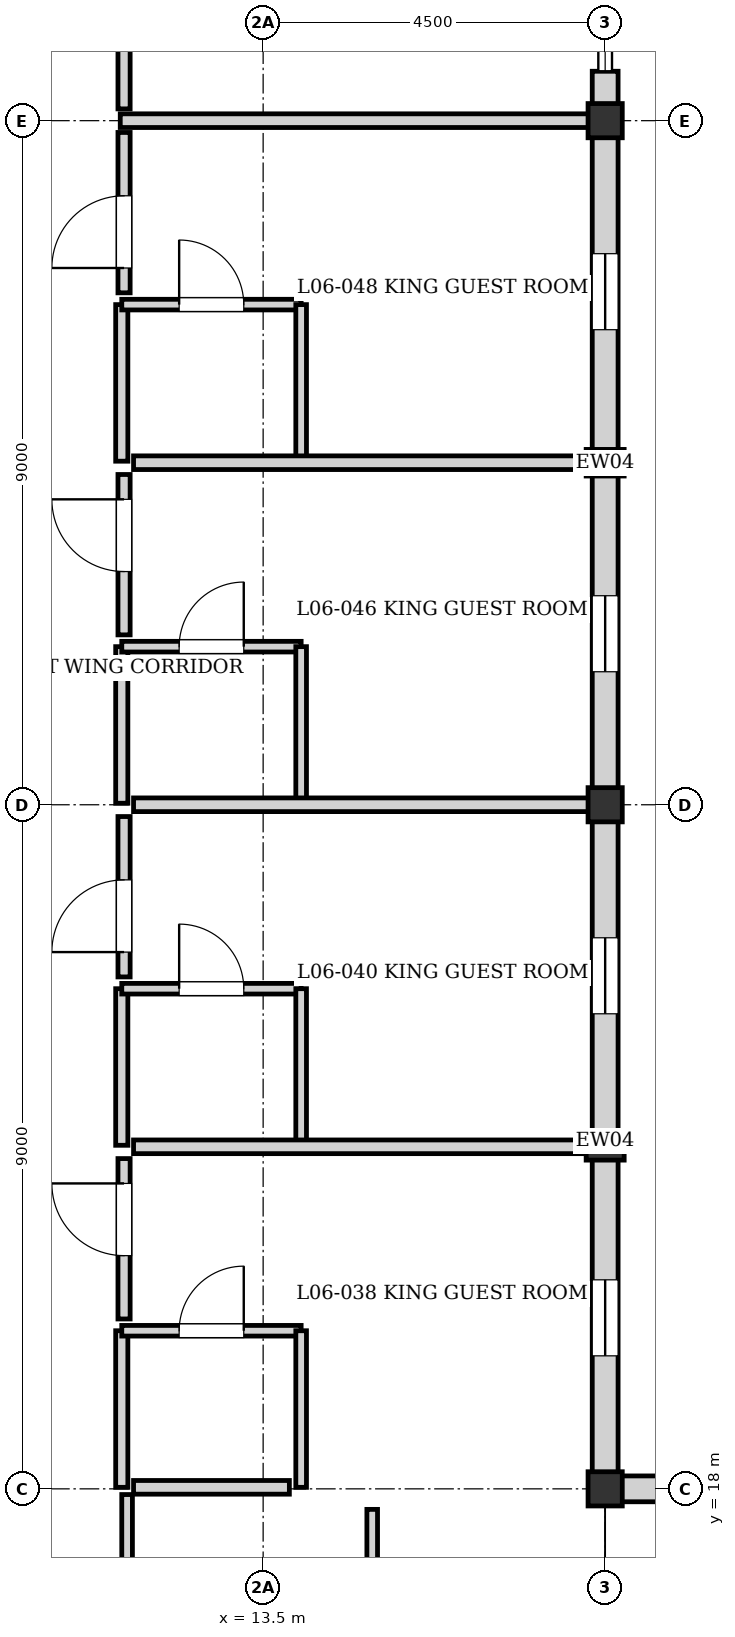
"""IFC4 building model, lengths in metres.
Left out: names, types, materials, properties, quantities, classifications, styles, units other than length and angle.
Written with IfcOpenShell. Run it as: python <this file> out.ifc"""

import sys

from ifc_helpers import new_model, si_unit, direction, frame, frame_2d, origin, origin_2d, place, context, subcontext, project, spatial, rectangle, extrude, element, fill, save


model = new_model("IFC4")
c1 = context("Model", 3, precision=1e-05, world=origin(), true_north=direction((0.0, 1.0)))
c2 = subcontext(c1, "Body", "Model", "MODEL_VIEW")
j1 = project(units=[si_unit("LENGTHUNIT", "METRE"), si_unit("PLANEANGLEUNIT", "RADIAN")], contexts=[c1])
p1 = place(None, origin())
s1 = spatial("IfcSite", under=j1, at=p1, CompositionType="ELEMENT")
p2 = place(p1, origin())
s2 = spatial("IfcBuilding", under=s1, at=p2, CompositionType="ELEMENT")
p3 = place(p2, frame((0.0, 0.0, 20.64)))
s3 = spatial("IfcBuildingStorey", under=s2, at=p3, CompositionType="ELEMENT", Elevation=20.64)
for number, where, z_axis, x_axis in (
    (1, (18.0, 18.0, 0.0), (0.0, 0.0, 1.0), (1.0, 0.0, 0.0)),
    (2, (18.0, 27.0, 0.0), (0.0, 0.0, 1.0), (1.0, 0.0, 0.0)),
    (3, (18.0, 36.0, 0.0), (0.0, 0.0, 1.0), (1.0, 0.0, 0.0)),
):
    element("IfcColumn", number, at=place(p3, frame(where, z_axis=z_axis, x_axis=x_axis)), inside=s3, PredefinedType="COLUMN", context=c2, shape_type="SweptSolid", body=[
        extrude(rectangle(XDim=0.45, YDim=0.45, at=origin_2d()), origin(), (0.0, 0.0, 1.0), 3.04),
    ])
for number, where, z_axis, x_axis in (
    (4, (18.0, 22.5, 0.0), (0.0, 0.0, 1.0), (0.0, 1.0, 0.0)),
    (5, (18.0, 31.5, 0.0), (0.0, 0.0, 1.0), (0.0, 1.0, 0.0)),
):
    element("IfcColumn", number, at=place(p3, frame(where, z_axis=z_axis, x_axis=x_axis)), inside=s3, PredefinedType="PILASTER", context=c2, shape_type="SweptSolid", body=[
        extrude(rectangle(XDim=0.35, YDim=0.5, at=origin_2d()), origin(), (0.0, 0.0, 1.0), 3.04),
    ])
p4 = place(p3, frame((18.0, 36.65, 0.0), z_axis=(0.0, 0.0, 1.0), x_axis=(0.0, -1.0, 0.0)))
e6 = element("IfcWall", 6, at=p4, inside=s3, PredefinedType="SOLIDWALL", context=c2, shape_type="SweptSolid", body=[
    extrude(rectangle(XDim=0.65, YDim=0.34, at=frame_2d((0.325, 0.0))), origin(), (0.0, 0.0, 1.0), 2.48),
])
p5 = place(p3, frame((18.0, 36.0, 0.0), z_axis=(0.0, 0.0, 1.0), x_axis=(0.0, -1.0, 0.0)))
e7 = element("IfcWall", 7, at=p5, inside=s3, PredefinedType="SOLIDWALL", context=c2, shape_type="SweptSolid", body=[
    extrude(rectangle(XDim=9.0, YDim=0.34, at=frame_2d((4.5, 0.0))), origin(), (0.0, 0.0, 1.0), 2.82),
])
p6 = place(p5, frame((1.75, 0.0, 0.35)))
e8 = element("IfcOpeningElement", 8, at=p6, cuts=e7, PredefinedType="OPENING", context=c2, shape_type="SweptSolid", body=[
    extrude(rectangle(XDim=1.0, YDim=1.6, at=frame_2d((0.5, 0.8))), frame((0.0, 0.18, 0.0), z_axis=(0.0, -1.0, 0.0), x_axis=(1.0, 0.0, 0.0)), (0.0, 0.0, 1.0), 0.36),
])
p7 = place(p5, frame((6.25, 0.0, 0.35)))
e9 = element("IfcOpeningElement", 9, at=p7, cuts=e7, PredefinedType="OPENING", context=c2, shape_type="SweptSolid", body=[
    extrude(rectangle(XDim=1.0, YDim=1.6, at=frame_2d((0.5, 0.8))), frame((0.0, 0.18, 0.0), z_axis=(0.0, -1.0, 0.0), x_axis=(1.0, 0.0, 0.0)), (0.0, 0.0, 1.0), 0.36),
])
p8 = place(p3, frame((18.0, 27.0, 0.0), z_axis=(0.0, 0.0, 1.0), x_axis=(0.0, -1.0, 0.0)))
e10 = element("IfcWall", 10, at=p8, inside=s3, PredefinedType="SOLIDWALL", context=c2, shape_type="SweptSolid", body=[
    extrude(rectangle(XDim=8.845, YDim=0.34, at=frame_2d((4.422, 0.0))), origin(), (0.0, 0.0, 1.0), 2.38),
])
p9 = place(p8, frame((1.75, 0.0, 0.35)))
e11 = element("IfcOpeningElement", 11, at=p9, cuts=e10, PredefinedType="OPENING", context=c2, shape_type="SweptSolid", body=[
    extrude(rectangle(XDim=1.0, YDim=1.6, at=frame_2d((0.5, 0.8))), frame((0.0, 0.18, 0.0), z_axis=(0.0, -1.0, 0.0), x_axis=(1.0, 0.0, 0.0)), (0.0, 0.0, 1.0), 0.36),
])
p10 = place(p8, frame((6.25, 0.0, 0.35)))
e12 = element("IfcOpeningElement", 12, at=p10, cuts=e10, PredefinedType="OPENING", context=c2, shape_type="SweptSolid", body=[
    extrude(rectangle(XDim=1.0, YDim=1.6, at=frame_2d((0.5, 0.8))), frame((0.0, 0.18, 0.0), z_axis=(0.0, -1.0, 0.0), x_axis=(1.0, 0.0, 0.0)), (0.0, 0.0, 1.0), 0.36),
])
p11 = place(p3, frame((18.0, 18.0, 0.0), z_axis=(0.0, 0.0, 1.0), x_axis=(1.0, 0.0, 0.0)))
e13 = element("IfcWall", 13, at=p11, inside=s3, PredefinedType="SOLIDWALL", context=c2, shape_type="SweptSolid", body=[
    extrude(rectangle(XDim=9.0, YDim=0.34, at=frame_2d((4.5, 0.0))), origin(), (0.0, 0.0, 1.0), 2.42),
])
p12 = place(p11, frame((1.75, 0.0, 0.35)))
e14 = element("IfcOpeningElement", 14, at=p12, cuts=e13, PredefinedType="OPENING", context=c2, shape_type="SweptSolid", body=[
    extrude(rectangle(XDim=1.0, YDim=1.6, at=frame_2d((0.5, 0.8))), frame((0.0, 0.18, 0.0), z_axis=(0.0, -1.0, 0.0), x_axis=(1.0, 0.0, 0.0)), (0.0, 0.0, 1.0), 0.36),
])
p13 = place(p11, frame((6.25, 0.0, 0.35)))
e15 = element("IfcOpeningElement", 15, at=p13, cuts=e13, PredefinedType="OPENING", context=c2, shape_type="SweptSolid", body=[
    extrude(rectangle(XDim=1.0, YDim=1.6, at=frame_2d((0.5, 0.8))), frame((0.0, 0.18, 0.0), z_axis=(0.0, -1.0, 0.0), x_axis=(1.0, 0.0, 0.0)), (0.0, 0.0, 1.0), 0.36),
])
p14 = place(p3, frame((11.64, 18.02, 0.0), z_axis=(0.0, 0.0, 1.0), x_axis=(0.0, 1.0, 0.0)))
e16 = element("IfcWall", 16, at=p14, inside=s3, PredefinedType="PARTITIONING", context=c2, shape_type="SweptSolid", body=[
    extrude(rectangle(XDim=2.06, YDim=0.16, at=frame_2d((1.03, 0.0))), origin(), (0.0, 0.0, 1.0), 2.82),
])
p15 = place(p3, frame((11.64, 20.08, 0.0), z_axis=(0.0, 0.0, 1.0), x_axis=(1.0, 0.0, 0.0)))
e17 = element("IfcWall", 17, at=p15, inside=s3, PredefinedType="PLUMBINGWALL", context=c2, shape_type="SweptSolid", body=[
    extrude(rectangle(XDim=2.36, YDim=0.14, at=frame_2d((1.18, 0.0))), origin(), (0.0, 0.0, 1.0), 2.82),
])
p16 = place(p15, frame((0.755, 0.0, 0.0)))
e18 = element("IfcOpeningElement", 18, at=p16, cuts=e17, PredefinedType="OPENING", context=c2, shape_type="SweptSolid", body=[
    extrude(rectangle(XDim=0.85, YDim=2.04, at=frame_2d((0.425, 1.02))), frame((0.0, 0.08, 0.0), z_axis=(0.0, -1.0, 0.0), x_axis=(1.0, 0.0, 0.0)), (0.0, 0.0, 1.0), 0.16),
])
p17 = place(p3, frame((14.0, 18.02, 0.0), z_axis=(0.0, 0.0, 1.0), x_axis=(0.0, 1.0, 0.0)))
e19 = element("IfcWall", 19, at=p17, inside=s3, PredefinedType="PLUMBINGWALL", context=c2, shape_type="SweptSolid", body=[
    extrude(rectangle(XDim=2.06, YDim=0.14, at=frame_2d((1.03, 0.0))), origin(), (0.0, 0.0, 1.0), 2.82),
])
p18 = place(p3, frame((11.64, 22.52, 0.0), z_axis=(0.0, 0.0, 1.0), x_axis=(0.0, 1.0, 0.0)))
e20 = element("IfcWall", 20, at=p18, inside=s3, PredefinedType="PARTITIONING", context=c2, shape_type="SweptSolid", body=[
    extrude(rectangle(XDim=2.06, YDim=0.16, at=frame_2d((1.03, 0.0))), origin(), (0.0, 0.0, 1.0), 2.82),
])
p19 = place(p3, frame((11.64, 24.58, 0.0), z_axis=(0.0, 0.0, 1.0), x_axis=(1.0, 0.0, 0.0)))
e21 = element("IfcWall", 21, at=p19, inside=s3, PredefinedType="PLUMBINGWALL", context=c2, shape_type="SweptSolid", body=[
    extrude(rectangle(XDim=2.36, YDim=0.14, at=frame_2d((1.18, 0.0))), origin(), (0.0, 0.0, 1.0), 2.82),
])
p20 = place(p19, frame((0.755, 0.0, 0.0)))
e22 = element("IfcOpeningElement", 22, at=p20, cuts=e21, PredefinedType="OPENING", context=c2, shape_type="SweptSolid", body=[
    extrude(rectangle(XDim=0.85, YDim=2.04, at=frame_2d((0.425, 1.02))), frame((0.0, 0.08, 0.0), z_axis=(0.0, -1.0, 0.0), x_axis=(1.0, 0.0, 0.0)), (0.0, 0.0, 1.0), 0.16),
])
p21 = place(p3, frame((14.0, 22.52, 0.0), z_axis=(0.0, 0.0, 1.0), x_axis=(0.0, 1.0, 0.0)))
e23 = element("IfcWall", 23, at=p21, inside=s3, PredefinedType="PLUMBINGWALL", context=c2, shape_type="SweptSolid", body=[
    extrude(rectangle(XDim=2.06, YDim=0.14, at=frame_2d((1.03, 0.0))), origin(), (0.0, 0.0, 1.0), 2.82),
])
p22 = place(p3, frame((11.64, 27.02, 0.0), z_axis=(0.0, 0.0, 1.0), x_axis=(0.0, 1.0, 0.0)))
e24 = element("IfcWall", 24, at=p22, inside=s3, PredefinedType="PARTITIONING", context=c2, shape_type="SweptSolid", body=[
    extrude(rectangle(XDim=2.06, YDim=0.16, at=frame_2d((1.03, 0.0))), origin(), (0.0, 0.0, 1.0), 2.82),
])
p23 = place(p3, frame((11.64, 29.08, 0.0), z_axis=(0.0, 0.0, 1.0), x_axis=(1.0, 0.0, 0.0)))
e25 = element("IfcWall", 25, at=p23, inside=s3, PredefinedType="PLUMBINGWALL", context=c2, shape_type="SweptSolid", body=[
    extrude(rectangle(XDim=2.36, YDim=0.14, at=frame_2d((1.18, 0.0))), origin(), (0.0, 0.0, 1.0), 2.82),
])
p24 = place(p23, frame((0.755, 0.0, 0.0)))
e26 = element("IfcOpeningElement", 26, at=p24, cuts=e25, PredefinedType="OPENING", context=c2, shape_type="SweptSolid", body=[
    extrude(rectangle(XDim=0.85, YDim=2.04, at=frame_2d((0.425, 1.02))), frame((0.0, 0.08, 0.0), z_axis=(0.0, -1.0, 0.0), x_axis=(1.0, 0.0, 0.0)), (0.0, 0.0, 1.0), 0.16),
])
p25 = place(p3, frame((14.0, 27.02, 0.0), z_axis=(0.0, 0.0, 1.0), x_axis=(0.0, 1.0, 0.0)))
e27 = element("IfcWall", 27, at=p25, inside=s3, PredefinedType="PLUMBINGWALL", context=c2, shape_type="SweptSolid", body=[
    extrude(rectangle(XDim=2.06, YDim=0.14, at=frame_2d((1.03, 0.0))), origin(), (0.0, 0.0, 1.0), 2.82),
])
p26 = place(p3, frame((11.64, 31.52, 0.0), z_axis=(0.0, 0.0, 1.0), x_axis=(0.0, 1.0, 0.0)))
e28 = element("IfcWall", 28, at=p26, inside=s3, PredefinedType="PARTITIONING", context=c2, shape_type="SweptSolid", body=[
    extrude(rectangle(XDim=2.06, YDim=0.16, at=frame_2d((1.03, 0.0))), origin(), (0.0, 0.0, 1.0), 2.82),
])
p27 = place(p3, frame((11.64, 33.58, 0.0), z_axis=(0.0, 0.0, 1.0), x_axis=(1.0, 0.0, 0.0)))
e29 = element("IfcWall", 29, at=p27, inside=s3, PredefinedType="PLUMBINGWALL", context=c2, shape_type="SweptSolid", body=[
    extrude(rectangle(XDim=2.36, YDim=0.14, at=frame_2d((1.18, 0.0))), origin(), (0.0, 0.0, 1.0), 2.82),
])
p28 = place(p27, frame((0.755, 0.0, 0.0)))
e30 = element("IfcOpeningElement", 30, at=p28, cuts=e29, PredefinedType="OPENING", context=c2, shape_type="SweptSolid", body=[
    extrude(rectangle(XDim=0.85, YDim=2.04, at=frame_2d((0.425, 1.02))), frame((0.0, 0.08, 0.0), z_axis=(0.0, -1.0, 0.0), x_axis=(1.0, 0.0, 0.0)), (0.0, 0.0, 1.0), 0.16),
])
p29 = place(p3, frame((14.0, 31.52, 0.0), z_axis=(0.0, 0.0, 1.0), x_axis=(0.0, 1.0, 0.0)))
e31 = element("IfcWall", 31, at=p29, inside=s3, PredefinedType="PLUMBINGWALL", context=c2, shape_type="SweptSolid", body=[
    extrude(rectangle(XDim=2.06, YDim=0.14, at=frame_2d((1.03, 0.0))), origin(), (0.0, 0.0, 1.0), 2.82),
])
p30 = place(p3, frame((11.795, 22.5, 0.0), z_axis=(0.0, 0.0, 1.0), x_axis=(1.0, 0.0, 0.0)))
e32 = element("IfcWall", 32, at=p30, inside=s3, PredefinedType="PARTITIONING", context=c2, shape_type="SweptSolid", body=[
    extrude(rectangle(XDim=6.03, YDim=0.18, at=frame_2d((3.015, 0.0))), origin(), (0.0, 0.0, 1.0), 2.82),
])
p31 = place(p3, frame((11.795, 27.0, 0.0), z_axis=(0.0, 0.0, 1.0), x_axis=(1.0, 0.0, 0.0)))
e33 = element("IfcWall", 33, at=p31, inside=s3, PredefinedType="PARTITIONING", context=c2, shape_type="SweptSolid", body=[
    extrude(rectangle(XDim=6.03, YDim=0.18, at=frame_2d((3.015, 0.0))), origin(), (0.0, 0.0, 1.0), 2.42),
])
p32 = place(p3, frame((11.795, 31.5, 0.0), z_axis=(0.0, 0.0, 1.0), x_axis=(1.0, 0.0, 0.0)))
e34 = element("IfcWall", 34, at=p32, inside=s3, PredefinedType="PARTITIONING", context=c2, shape_type="SweptSolid", body=[
    extrude(rectangle(XDim=6.03, YDim=0.18, at=frame_2d((3.015, 0.0))), origin(), (0.0, 0.0, 1.0), 2.82),
])
p33 = place(p3, frame((11.62, 36.0, 0.0), z_axis=(0.0, 0.0, 1.0), x_axis=(1.0, 0.0, 0.0)))
e35 = element("IfcWall", 35, at=p33, inside=s3, PredefinedType="PARTITIONING", context=c2, shape_type="SweptSolid", body=[
    extrude(rectangle(XDim=6.205, YDim=0.18, at=frame_2d((3.103, 0.0))), origin(), (0.0, 0.0, 1.0), 2.38),
])
p34 = place(p3, frame((11.795, 18.02, 0.0), z_axis=(0.0, 0.0, 1.0), x_axis=(1.0, 0.0, 0.0)))
e36 = element("IfcWall", 36, at=p34, inside=s3, PredefinedType="PARTITIONING", context=c2, shape_type="SweptSolid", body=[
    extrude(rectangle(XDim=2.05, YDim=0.18, at=frame_2d((1.025, 0.0))), origin(), (0.0, 0.0, 1.0), 2.48),
])
p35 = place(p3, frame((11.71, 11.705, 0.0), z_axis=(0.0, 0.0, 1.0), x_axis=(0.0, 1.0, 0.0)))
e37 = element("IfcWall", 37, at=p35, inside=s3, PredefinedType="PLUMBINGWALL", context=c2, shape_type="SweptSolid", body=[
    extrude(rectangle(XDim=6.22, YDim=0.14, at=frame_2d((3.11, 0.0))), origin(), (0.0, 0.0, 1.0), 2.82),
])
p36 = place(p35, frame((1.914, 0.0, 0.0)))
e38 = element("IfcOpeningElement", 38, at=p36, cuts=e37, PredefinedType="OPENING", context=c2, shape_type="SweptSolid", body=[
    extrude(rectangle(XDim=0.9, YDim=2.1, at=frame_2d((0.45, 1.05))), frame((0.0, 0.08, 0.0), z_axis=(0.0, -1.0, 0.0), x_axis=(1.0, 0.0, 0.0)), (0.0, 0.0, 1.0), 0.16),
])
p37 = place(p3, frame((11.67, 20.235, 0.0), z_axis=(0.0, 0.0, 1.0), x_axis=(0.0, 1.0, 0.0)))
e39 = element("IfcWall", 39, at=p37, inside=s3, PredefinedType="PARTITIONING", context=c2, shape_type="SweptSolid", body=[
    extrude(rectangle(XDim=2.11, YDim=0.16, at=frame_2d((1.055, 0.0))), origin(), (0.0, 0.0, 1.0), 2.82),
])
p38 = place(p37, frame((0.833, 0.0, 0.0)))
e40 = element("IfcOpeningElement", 40, at=p38, cuts=e39, PredefinedType="OPENING", context=c2, shape_type="SweptSolid", body=[
    extrude(rectangle(XDim=0.95, YDim=2.15, at=frame_2d((0.475, 1.075))), frame((0.0, 0.09, 0.0), z_axis=(0.0, -1.0, 0.0), x_axis=(1.0, 0.0, 0.0)), (0.0, 0.0, 1.0), 0.18),
])
p39 = place(p3, frame((11.67, 24.735, 0.0), z_axis=(0.0, 0.0, 1.0), x_axis=(0.0, 1.0, 0.0)))
e41 = element("IfcWall", 41, at=p39, inside=s3, PredefinedType="PARTITIONING", context=c2, shape_type="SweptSolid", body=[
    extrude(rectangle(XDim=2.11, YDim=0.16, at=frame_2d((1.055, 0.0))), origin(), (0.0, 0.0, 1.0), 2.82),
])
p40 = place(p39, frame((0.327, 0.0, 0.0)))
e42 = element("IfcOpeningElement", 42, at=p40, cuts=e41, PredefinedType="OPENING", context=c2, shape_type="SweptSolid", body=[
    extrude(rectangle(XDim=0.95, YDim=2.15, at=frame_2d((0.475, 1.075))), frame((0.0, 0.09, 0.0), z_axis=(0.0, -1.0, 0.0), x_axis=(1.0, 0.0, 0.0)), (0.0, 0.0, 1.0), 0.18),
])
p41 = place(p3, frame((11.67, 29.235, 0.0), z_axis=(0.0, 0.0, 1.0), x_axis=(0.0, 1.0, 0.0)))
e43 = element("IfcWall", 43, at=p41, inside=s3, PredefinedType="PARTITIONING", context=c2, shape_type="SweptSolid", body=[
    extrude(rectangle(XDim=2.11, YDim=0.16, at=frame_2d((1.055, 0.0))), origin(), (0.0, 0.0, 1.0), 2.82),
])
p42 = place(p41, frame((0.833, 0.0, 0.0)))
e44 = element("IfcOpeningElement", 44, at=p42, cuts=e43, PredefinedType="OPENING", context=c2, shape_type="SweptSolid", body=[
    extrude(rectangle(XDim=0.95, YDim=2.15, at=frame_2d((0.475, 1.075))), frame((0.0, 0.09, 0.0), z_axis=(0.0, -1.0, 0.0), x_axis=(1.0, 0.0, 0.0)), (0.0, 0.0, 1.0), 0.18),
])
p43 = place(p3, frame((11.67, 33.735, 0.0), z_axis=(0.0, 0.0, 1.0), x_axis=(0.0, 1.0, 0.0)))
e45 = element("IfcWall", 45, at=p43, inside=s3, PredefinedType="PARTITIONING", context=c2, shape_type="SweptSolid", body=[
    extrude(rectangle(XDim=2.11, YDim=0.16, at=frame_2d((1.055, 0.0))), origin(), (0.0, 0.0, 1.0), 2.82),
])
p44 = place(p43, frame((0.327, 0.0, 0.0)))
e46 = element("IfcOpeningElement", 46, at=p44, cuts=e45, PredefinedType="OPENING", context=c2, shape_type="SweptSolid", body=[
    extrude(rectangle(XDim=0.95, YDim=2.15, at=frame_2d((0.475, 1.075))), frame((0.0, 0.09, 0.0), z_axis=(0.0, -1.0, 0.0), x_axis=(1.0, 0.0, 0.0)), (0.0, 0.0, 1.0), 0.18),
])
p45 = place(p3, frame((11.67, 36.155, 0.0), z_axis=(0.0, 0.0, 1.0), x_axis=(0.0, 1.0, 0.0)))
e47 = element("IfcWall", 47, at=p45, inside=s3, PredefinedType="PARTITIONING", context=c2, shape_type="SweptSolid", body=[
    extrude(rectangle(XDim=4.125, YDim=0.16, at=frame_2d((2.062, 0.0))), origin(), (0.0, 0.0, 1.0), 2.82),
])
p46 = place(p45, frame((2.058, 0.0, 0.0)))
e48 = element("IfcOpeningElement", 48, at=p46, cuts=e47, PredefinedType="OPENING", context=c2, shape_type="SweptSolid", body=[
    extrude(rectangle(XDim=1.0, YDim=2.1, at=frame_2d((0.5, 1.05))), frame((0.0, 0.09, 0.0), z_axis=(0.0, -1.0, 0.0), x_axis=(1.0, 0.0, 0.0)), (0.0, 0.0, 1.0), 0.18),
])
p47 = place(p3, frame((14.935, 14.845, 0.0), z_axis=(0.0, 0.0, 1.0), x_axis=(0.0, 1.0, 0.0)))
e49 = element("IfcWall", 49, at=p47, inside=s3, PredefinedType="PLUMBINGWALL", context=c2, shape_type="SweptSolid", body=[
    extrude(rectangle(XDim=2.885, YDim=0.14, at=frame_2d((1.442, 0.0))), origin(), (0.0, 0.0, 1.0), 2.82),
])
p48 = place(p47, frame((0.646, 0.0, 0.0)))
e50 = element("IfcOpeningElement", 50, at=p48, cuts=e49, PredefinedType="OPENING", context=c2, shape_type="SweptSolid", body=[
    extrude(rectangle(XDim=0.9, YDim=2.1, at=frame_2d((0.45, 1.05))), frame((0.0, 0.08, 0.0), z_axis=(0.0, -1.0, 0.0), x_axis=(1.0, 0.0, 0.0)), (0.0, 0.0, 1.0), 0.16),
])
p49 = place(p6, origin())
e51 = element("IfcWindow", 51, at=p49, inside=s3, PartitioningType="SINGLE_PANEL", PredefinedType="WINDOW", context=c2, shape_type="SweptSolid", body=[
    extrude(rectangle(XDim=1.0, YDim=1.6, at=frame_2d((0.5, 0.8))), frame((0.0, 0.03, 0.0), z_axis=(0.0, -1.0, 0.0), x_axis=(1.0, 0.0, 0.0)), (0.0, 0.0, 1.0), 0.06),
])
fill(e8, e51)
p50 = place(p7, origin())
e52 = element("IfcWindow", 52, at=p50, inside=s3, PartitioningType="SINGLE_PANEL", PredefinedType="WINDOW", context=c2, shape_type="SweptSolid", body=[
    extrude(rectangle(XDim=1.0, YDim=1.6, at=frame_2d((0.5, 0.8))), frame((0.0, 0.03, 0.0), z_axis=(0.0, -1.0, 0.0), x_axis=(1.0, 0.0, 0.0)), (0.0, 0.0, 1.0), 0.06),
])
fill(e9, e52)
p51 = place(p9, origin())
e53 = element("IfcWindow", 53, at=p51, inside=s3, PartitioningType="SINGLE_PANEL", PredefinedType="WINDOW", context=c2, shape_type="SweptSolid", body=[
    extrude(rectangle(XDim=1.0, YDim=1.6, at=frame_2d((0.5, 0.8))), frame((0.0, 0.03, 0.0), z_axis=(0.0, -1.0, 0.0), x_axis=(1.0, 0.0, 0.0)), (0.0, 0.0, 1.0), 0.06),
])
fill(e11, e53)
p52 = place(p10, origin())
e54 = element("IfcWindow", 54, at=p52, inside=s3, PartitioningType="SINGLE_PANEL", PredefinedType="WINDOW", context=c2, shape_type="SweptSolid", body=[
    extrude(rectangle(XDim=1.0, YDim=1.6, at=frame_2d((0.5, 0.8))), frame((0.0, 0.03, 0.0), z_axis=(0.0, -1.0, 0.0), x_axis=(1.0, 0.0, 0.0)), (0.0, 0.0, 1.0), 0.06),
])
fill(e12, e54)
p53 = place(p16, origin())
e55 = element("IfcDoor", 55, at=p53, inside=s3, OperationType="SINGLE_SWING_RIGHT", PredefinedType="DOOR", context=c2, shape_type="SweptSolid", body=[
    extrude(rectangle(XDim=0.85, YDim=2.04, at=frame_2d((0.425, 1.02))), frame((0.0, 0.025, 0.0), z_axis=(0.0, -1.0, 0.0), x_axis=(1.0, 0.0, 0.0)), (0.0, 0.0, 1.0), 0.05),
])
fill(e18, e55)
p54 = place(p20, origin())
e56 = element("IfcDoor", 56, at=p54, inside=s3, OperationType="SINGLE_SWING_LEFT", PredefinedType="DOOR", context=c2, shape_type="SweptSolid", body=[
    extrude(rectangle(XDim=0.85, YDim=2.04, at=frame_2d((0.425, 1.02))), frame((0.0, 0.025, 0.0), z_axis=(0.0, -1.0, 0.0), x_axis=(1.0, 0.0, 0.0)), (0.0, 0.0, 1.0), 0.05),
])
fill(e22, e56)
p55 = place(p24, origin())
e57 = element("IfcDoor", 57, at=p55, inside=s3, OperationType="SINGLE_SWING_RIGHT", PredefinedType="DOOR", context=c2, shape_type="SweptSolid", body=[
    extrude(rectangle(XDim=0.85, YDim=2.04, at=frame_2d((0.425, 1.02))), frame((0.0, 0.025, 0.0), z_axis=(0.0, -1.0, 0.0), x_axis=(1.0, 0.0, 0.0)), (0.0, 0.0, 1.0), 0.05),
])
fill(e26, e57)
p56 = place(p28, origin())
e58 = element("IfcDoor", 58, at=p56, inside=s3, OperationType="SINGLE_SWING_LEFT", PredefinedType="DOOR", context=c2, shape_type="SweptSolid", body=[
    extrude(rectangle(XDim=0.85, YDim=2.04, at=frame_2d((0.425, 1.02))), frame((0.0, 0.025, 0.0), z_axis=(0.0, -1.0, 0.0), x_axis=(1.0, 0.0, 0.0)), (0.0, 0.0, 1.0), 0.05),
])
fill(e30, e58)
p57 = place(p38, origin())
e59 = element("IfcDoor", 59, at=p57, inside=s3, OperationType="SINGLE_SWING_RIGHT", PredefinedType="DOOR", context=c2, shape_type="SweptSolid", body=[
    extrude(rectangle(XDim=0.95, YDim=2.15, at=frame_2d((0.475, 1.075))), frame((0.0, 0.025, 0.0), z_axis=(0.0, -1.0, 0.0), x_axis=(1.0, 0.0, 0.0)), (0.0, 0.0, 1.0), 0.05),
])
fill(e40, e59)
p58 = place(p40, origin())
e60 = element("IfcDoor", 60, at=p58, inside=s3, OperationType="SINGLE_SWING_LEFT", PredefinedType="DOOR", context=c2, shape_type="SweptSolid", body=[
    extrude(rectangle(XDim=0.95, YDim=2.15, at=frame_2d((0.475, 1.075))), frame((0.0, 0.025, 0.0), z_axis=(0.0, -1.0, 0.0), x_axis=(1.0, 0.0, 0.0)), (0.0, 0.0, 1.0), 0.05),
])
fill(e42, e60)
p59 = place(p42, origin())
e61 = element("IfcDoor", 61, at=p59, inside=s3, OperationType="SINGLE_SWING_RIGHT", PredefinedType="DOOR", context=c2, shape_type="SweptSolid", body=[
    extrude(rectangle(XDim=0.95, YDim=2.15, at=frame_2d((0.475, 1.075))), frame((0.0, 0.025, 0.0), z_axis=(0.0, -1.0, 0.0), x_axis=(1.0, 0.0, 0.0)), (0.0, 0.0, 1.0), 0.05),
])
fill(e44, e61)
p60 = place(p44, origin())
e62 = element("IfcDoor", 62, at=p60, inside=s3, OperationType="SINGLE_SWING_LEFT", PredefinedType="DOOR", context=c2, shape_type="SweptSolid", body=[
    extrude(rectangle(XDim=0.95, YDim=2.15, at=frame_2d((0.475, 1.075))), frame((0.0, 0.025, 0.0), z_axis=(0.0, -1.0, 0.0), x_axis=(1.0, 0.0, 0.0)), (0.0, 0.0, 1.0), 0.05),
])
fill(e46, e62)
save(model, sys.argv[1])
